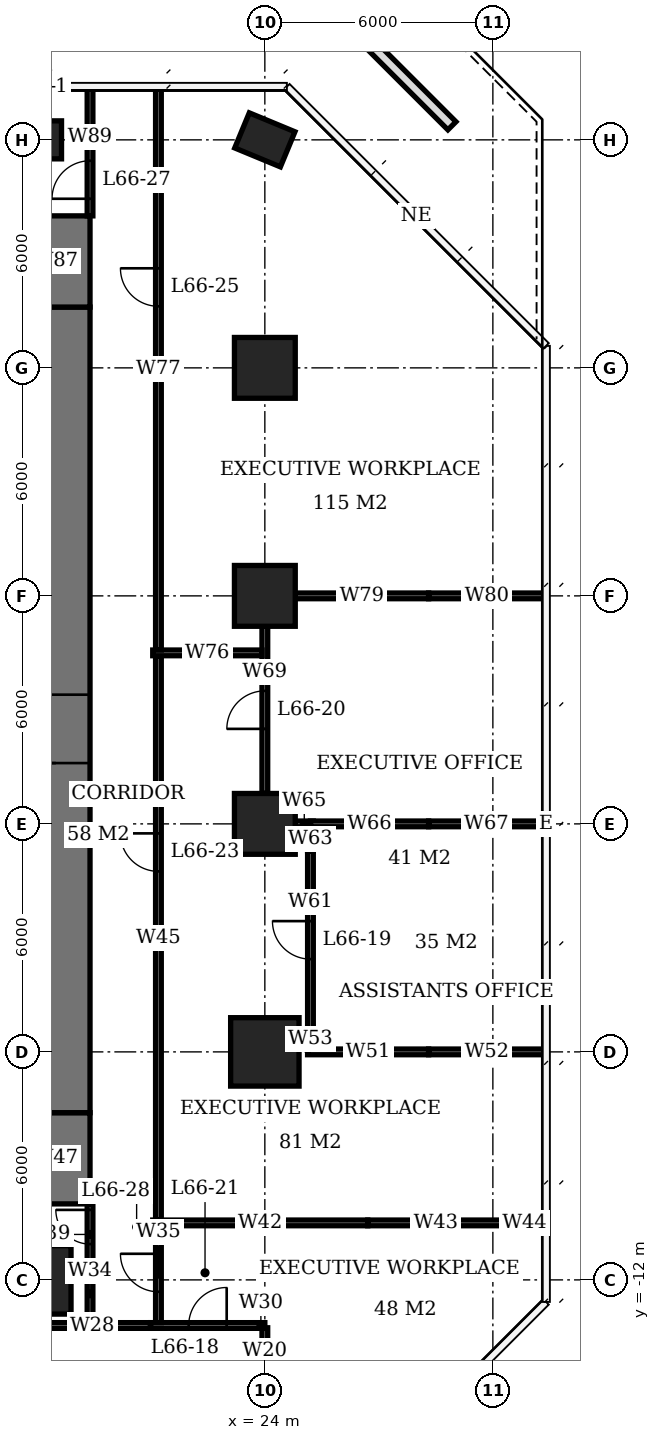
"""IFC4 building model, lengths in metres.
Left out: names, types, materials, properties, quantities, classifications, styles, units other than length and angle.
Written with IfcOpenShell. Run it as: python <this file> out.ifc"""

import sys

from ifc_helpers import new_model, si_unit, direction, frame, frame_2d, origin, origin_2d, place, context, subcontext, project, spatial, rectangle, extrude, element, fill, save


model = new_model("IFC4")
c1 = context("Model", 3, precision=1e-05, world=origin(), true_north=direction((0.0, 1.0)))
c2 = subcontext(c1, "Body", "Model", "MODEL_VIEW")
j1 = project(units=[si_unit("LENGTHUNIT", "METRE"), si_unit("PLANEANGLEUNIT", "RADIAN")], contexts=[c1])
p1 = place(None, origin())
s1 = spatial("IfcSite", under=j1, at=p1, CompositionType="ELEMENT")
p2 = place(p1, origin())
s2 = spatial("IfcBuilding", under=s1, at=p2, CompositionType="ELEMENT")
p3 = place(p2, frame((0.0, 0.0, 268.4)))
s3 = spatial("IfcBuildingStorey", under=s2, at=p3, CompositionType="ELEMENT", Elevation=268.4)
p4 = place(p3, frame((18.0, -12.0, 0.0), z_axis=(0.0, 0.0, 1.0), x_axis=(1.0, 0.0, 0.0)))
e1 = element("IfcColumn", 1, at=p4, inside=s3, PredefinedType="COLUMN", context=c2, shape_type="SweptSolid", body=[
    extrude(rectangle(XDim=1.8, YDim=1.8, at=origin_2d()), origin(), (0.0, 0.0, 1.0), 3.9),
])
p5 = place(p3, frame((18.0, 18.0, 0.0), z_axis=(0.0, 0.0, 1.0), x_axis=(1.0, 0.0, 0.0)))
e2 = element("IfcColumn", 2, at=p5, inside=s3, PredefinedType="COLUMN", context=c2, shape_type="SweptSolid", body=[
    extrude(rectangle(XDim=1.3, YDim=1.0, at=origin_2d()), origin(), (0.0, 0.0, 1.0), 3.9),
])
p6 = place(p3, frame((24.0, -6.0, 0.0), z_axis=(0.0, 0.0, 1.0), x_axis=(1.0, 0.0, 0.0)))
e3 = element("IfcColumn", 3, at=p6, inside=s3, PredefinedType="COLUMN", context=c2, shape_type="SweptSolid", body=[
    extrude(rectangle(XDim=1.8, YDim=1.8, at=origin_2d()), origin(), (0.0, 0.0, 1.0), 3.9),
])
for number, where, z_axis, x_axis in (
    (4, (24.0, 0.0, 0.0), (0.0, 0.0, 1.0), (1.0, 0.0, 0.0)),
    (5, (24.0, 6.0, 0.0), (0.0, 0.0, 1.0), (1.0, 0.0, 0.0)),
    (6, (24.0, 12.0, 0.0), (0.0, 0.0, 1.0), (1.0, 0.0, 0.0)),
):
    element("IfcColumn", number, at=place(p3, frame(where, z_axis=z_axis, x_axis=x_axis)), inside=s3, PredefinedType="COLUMN", context=c2, shape_type="SweptSolid", body=[
        extrude(rectangle(XDim=1.6, YDim=1.6, at=origin_2d()), origin(), (0.0, 0.0, 1.0), 3.9),
    ])
p7 = place(p3, frame((24.0, 18.0, 0.0), z_axis=(0.0, 0.0, 1.0), x_axis=(0.923879532511, -0.382683432365, 0.0)))
e7 = element("IfcColumn", 7, at=p7, inside=s3, PredefinedType="COLUMN", context=c2, shape_type="SweptSolid", body=[
    extrude(rectangle(XDim=1.3, YDim=1.0, at=origin_2d()), origin(), (0.0, 0.0, 1.0), 3.9),
])
p8 = place(p3, frame((18.5, -7.6, 0.0), z_axis=(0.0, 0.0, 1.0), x_axis=(0.0, 1.0, 0.0)))
e8 = element("IfcWall", 8, at=p8, inside=s3, PredefinedType="SHEAR", context=c2, shape_type="SweptSolid", body=[
    extrude(rectangle(XDim=21.2, YDim=1.8, at=frame_2d((10.6, 0.0))), origin(), (0.0, 0.0, 1.0), 3.9),
])
p9 = place(p8, frame((9.2, 0.0, 0.0)))
e9 = element("IfcOpeningElement", 9, at=p9, cuts=e8, PredefinedType="OPENING", context=c2, shape_type="SweptSolid", body=[
    extrude(rectangle(XDim=1.8, YDim=2.4, at=frame_2d((0.9, 1.2))), frame((0.0, 0.91, 0.0), z_axis=(0.0, -1.0, 0.0), x_axis=(1.0, 0.0, 0.0)), (0.0, 0.0, 1.0), 1.82),
])
for number, where, z_axis, x_axis in (
    (10, (18.5, -10.0, 0.0), (0.0, 0.0, 1.0), (0.0, 1.0, 0.0)),
    (11, (18.5, 13.6, 0.0), (0.0, 0.0, 1.0), (0.0, 1.0, 0.0)),
):
    element("IfcWall", number, at=place(p3, frame(where, z_axis=z_axis, x_axis=x_axis)), inside=s3, PredefinedType="SHEAR", context=c2, shape_type="SweptSolid", body=[
        extrude(rectangle(XDim=2.4, YDim=1.8, at=frame_2d((1.2, 0.0))), origin(), (0.0, 0.0, 1.0), 3.9),
    ])
p10 = place(p3, frame((24.37, 22.923, 0.0), z_axis=(0.0, 0.0, 1.0), x_axis=(0.707106781187, -0.707106781187, 0.0)))
e12 = element("IfcWall", 12, at=p10, inside=s3, PredefinedType="USERDEFINED", context=c2, shape_type="SweptSolid", body=[
    extrude(rectangle(XDim=6.438, YDim=0.3, at=frame_2d((3.219, 0.0))), origin(), (0.0, 0.0, 1.0), 0.6),
])
p11 = place(p3, frame((17.925, -13.2, 0.0), z_axis=(0.0, 0.0, 1.0), x_axis=(1.0, 0.0, 0.0)))
e13 = element("IfcWall", 13, at=p11, inside=s3, PredefinedType="PARTITIONING", context=c2, shape_type="SweptSolid", body=[
    extrude(rectangle(XDim=3.067, YDim=0.15, at=frame_2d((1.534, 0.0))), origin(), (0.0, 0.0, 1.0), 2.65),
])
p12 = place(p3, frame((20.992, -13.2, 0.0), z_axis=(0.0, 0.0, 1.0), x_axis=(1.0, 0.0, 0.0)))
e14 = element("IfcWall", 14, at=p12, inside=s3, PredefinedType="PARTITIONING", context=c2, shape_type="SweptSolid", body=[
    extrude(rectangle(XDim=3.008, YDim=0.15, at=frame_2d((1.504, 0.0))), origin(), (0.0, 0.0, 1.0), 3.65),
])
p13 = place(p12, frame((1.004, 0.0, 0.0)))
e15 = element("IfcOpeningElement", 15, at=p13, cuts=e14, PredefinedType="OPENING", context=c2, shape_type="SweptSolid", body=[
    extrude(rectangle(XDim=1.0, YDim=2.4, at=frame_2d((0.5, 1.2))), frame((0.0, 0.085, 0.0), z_axis=(0.0, -1.0, 0.0), x_axis=(1.0, 0.0, 0.0)), (0.0, 0.0, 1.0), 0.17),
])
p14 = place(p3, frame((25.125, -6.0, 0.0), z_axis=(0.0, 0.0, 1.0), x_axis=(1.0, 0.0, 0.0)))
e16 = element("IfcWall", 16, at=p14, inside=s3, PredefinedType="PARTITIONING", context=c2, shape_type="SweptSolid", body=[
    extrude(rectangle(XDim=3.185, YDim=0.15, at=frame_2d((1.593, 0.0))), origin(), (0.0, 0.0, 1.0), 2.65),
])
p15 = place(p3, frame((28.31, -6.0, 0.0), z_axis=(0.0, 0.0, 1.0), x_axis=(1.0, 0.0, 0.0)))
e17 = element("IfcWall", 17, at=p15, inside=s3, PredefinedType="PARTITIONING", context=c2, shape_type="SweptSolid", body=[
    extrude(rectangle(XDim=3.065, YDim=0.15, at=frame_2d((1.532, 0.0))), origin(), (0.0, 0.0, 1.0), 3.65),
])
p16 = place(p3, frame((24.8, 0.0, 0.0), z_axis=(0.0, 0.0, 1.0), x_axis=(1.0, 0.0, 0.0)))
e18 = element("IfcWall", 18, at=p16, inside=s3, PredefinedType="PARTITIONING", context=c2, shape_type="SweptSolid", body=[
    extrude(rectangle(XDim=0.475, YDim=0.15, at=frame_2d((0.237, 0.0))), origin(), (0.0, 0.0, 1.0), 2.65),
])
p17 = place(p3, frame((25.2, 0.0, 0.0), z_axis=(0.0, 0.0, 1.0), x_axis=(1.0, 0.0, 0.0)))
e19 = element("IfcWall", 19, at=p17, inside=s3, PredefinedType="PARTITIONING", context=c2, shape_type="SweptSolid", body=[
    extrude(rectangle(XDim=3.11, YDim=0.15, at=frame_2d((1.555, 0.0))), origin(), (0.0, 0.0, 1.0), 2.65),
])
p18 = place(p3, frame((28.31, 0.0, 0.0), z_axis=(0.0, 0.0, 1.0), x_axis=(1.0, 0.0, 0.0)))
e20 = element("IfcWall", 20, at=p18, inside=s3, PredefinedType="PARTITIONING", context=c2, shape_type="SweptSolid", body=[
    extrude(rectangle(XDim=3.04, YDim=0.15, at=frame_2d((1.52, 0.0))), origin(), (0.0, 0.0, 1.0), 3.65),
])
p19 = place(p3, frame((24.8, 6.0, 0.0), z_axis=(0.0, 0.0, 1.0), x_axis=(1.0, 0.0, 0.0)))
e21 = element("IfcWall", 21, at=p19, inside=s3, PredefinedType="PARTITIONING", context=c2, shape_type="SweptSolid", body=[
    extrude(rectangle(XDim=3.51, YDim=0.15, at=frame_2d((1.755, 0.0))), origin(), (0.0, 0.0, 1.0), 2.65),
])
p20 = place(p3, frame((28.31, 6.0, 0.0), z_axis=(0.0, 0.0, 1.0), x_axis=(1.0, 0.0, 0.0)))
e22 = element("IfcWall", 22, at=p20, inside=s3, PredefinedType="PARTITIONING", context=c2, shape_type="SweptSolid", body=[
    extrude(rectangle(XDim=3.065, YDim=0.15, at=frame_2d((1.532, 0.0))), origin(), (0.0, 0.0, 1.0), 3.65),
])
p21 = place(p3, frame((24.0, -14.49, 0.0), z_axis=(0.0, 0.0, 1.0), x_axis=(0.0, 1.0, 0.0)))
e23 = element("IfcWall", 23, at=p21, inside=s3, PredefinedType="PARTITIONING", context=c2, shape_type="SweptSolid", body=[
    extrude(rectangle(XDim=1.23, YDim=0.15, at=frame_2d((0.615, 0.0))), origin(), (0.0, 0.0, 1.0), 2.65),
])
p22 = place(p3, frame((24.0, 0.8, 0.0), z_axis=(0.0, 0.0, 1.0), x_axis=(0.0, 1.0, 0.0)))
e24 = element("IfcWall", 24, at=p22, inside=s3, PredefinedType="PARTITIONING", context=c2, shape_type="SweptSolid", body=[
    extrude(rectangle(XDim=4.4, YDim=0.15, at=frame_2d((2.2, 0.0))), origin(), (0.0, 0.0, 1.0), 3.65),
])
p23 = place(p22, frame((1.7, 0.0, 0.0)))
e25 = element("IfcOpeningElement", 25, at=p23, cuts=e24, PredefinedType="OPENING", context=c2, shape_type="SweptSolid", body=[
    extrude(rectangle(XDim=1.0, YDim=2.4, at=frame_2d((0.5, 1.2))), frame((0.0, 0.085, 0.0), z_axis=(0.0, -1.0, 0.0), x_axis=(1.0, 0.0, 0.0)), (0.0, 0.0, 1.0), 0.17),
])
p24 = place(p3, frame((25.2, -5.925, 0.0), z_axis=(0.0, 0.0, 1.0), x_axis=(0.0, 1.0, 0.0)))
e26 = element("IfcWall", 26, at=p24, inside=s3, PredefinedType="PARTITIONING", context=c2, shape_type="SweptSolid", body=[
    extrude(rectangle(XDim=0.517, YDim=0.15, at=frame_2d((0.259, 0.0))), origin(), (0.0, 0.0, 1.0), 2.65),
])
p25 = place(p3, frame((25.2, -5.408, 0.0), z_axis=(0.0, 0.0, 1.0), x_axis=(0.0, 1.0, 0.0)))
e27 = element("IfcWall", 27, at=p25, inside=s3, PredefinedType="PARTITIONING", context=c2, shape_type="SweptSolid", body=[
    extrude(rectangle(XDim=4.698, YDim=0.15, at=frame_2d((2.349, 0.0))), origin(), (0.0, 0.0, 1.0), 3.65),
])
p26 = place(p25, frame((1.849, 0.0, 0.0)))
e28 = element("IfcOpeningElement", 28, at=p26, cuts=e27, PredefinedType="OPENING", context=c2, shape_type="SweptSolid", body=[
    extrude(rectangle(XDim=1.0, YDim=2.4, at=frame_2d((0.5, 1.2))), frame((0.0, 0.085, 0.0), z_axis=(0.0, -1.0, 0.0), x_axis=(1.0, 0.0, 0.0)), (0.0, 0.0, 1.0), 0.17),
])
p27 = place(p3, frame((25.2, -0.71, 0.0), z_axis=(0.0, 0.0, 1.0), x_axis=(0.0, 1.0, 0.0)))
e29 = element("IfcWall", 29, at=p27, inside=s3, PredefinedType="PARTITIONING", context=c2, shape_type="SweptSolid", body=[
    extrude(rectangle(XDim=0.635, YDim=0.15, at=frame_2d((0.317, 0.0))), origin(), (0.0, 0.0, 1.0), 2.65),
])
p28 = place(p3, frame((19.4, -13.125, 0.0), z_axis=(0.0, 0.0, 1.0), x_axis=(0.0, 1.0, 0.0)))
e30 = element("IfcWall", 30, at=p28, inside=s3, PredefinedType="PARTITIONING", context=c2, shape_type="SweptSolid", body=[
    extrude(rectangle(XDim=1.517, YDim=0.15, at=frame_2d((0.759, 0.0))), origin(), (0.0, 0.0, 1.0), 2.65),
])
p29 = place(p3, frame((19.4, -11.608, 0.0), z_axis=(0.0, 0.0, 1.0), x_axis=(0.0, 1.0, 0.0)))
e31 = element("IfcWall", 31, at=p29, inside=s3, PredefinedType="PARTITIONING", context=c2, shape_type="SweptSolid", body=[
    extrude(rectangle(XDim=1.608, YDim=0.15, at=frame_2d((0.804, 0.0))), origin(), (0.0, 0.0, 1.0), 3.65),
])
p30 = place(p29, frame((0.55, 0.0, 0.0)))
e32 = element("IfcOpeningElement", 32, at=p30, cuts=e31, PredefinedType="OPENING", context=c2, shape_type="SweptSolid", body=[
    extrude(rectangle(XDim=0.9, YDim=2.1, at=frame_2d((0.45, 1.05))), frame((0.0, 0.085, 0.0), z_axis=(0.0, -1.0, 0.0), x_axis=(1.0, 0.0, 0.0)), (0.0, 0.0, 1.0), 0.17),
])
p31 = place(p3, frame((19.4, 16.0, 0.0), z_axis=(0.0, 0.0, 1.0), x_axis=(0.0, 1.0, 0.0)))
e33 = element("IfcWall", 33, at=p31, inside=s3, PredefinedType="PARTITIONING", context=c2, shape_type="SweptSolid", body=[
    extrude(rectangle(XDim=3.375, YDim=0.15, at=frame_2d((1.688, 0.0))), origin(), (0.0, 0.0, 1.0), 3.65),
])
p32 = place(p31, frame((0.45, 0.0, 0.0)))
e34 = element("IfcOpeningElement", 34, at=p32, cuts=e33, PredefinedType="OPENING", context=c2, shape_type="SweptSolid", body=[
    extrude(rectangle(XDim=1.0, YDim=2.1, at=frame_2d((0.5, 1.05))), frame((0.0, 0.085, 0.0), z_axis=(0.0, -1.0, 0.0), x_axis=(1.0, 0.0, 0.0)), (0.0, 0.0, 1.0), 0.17),
])
p33 = place(p3, frame((21.2, -13.125, 0.0), z_axis=(0.0, 0.0, 1.0), x_axis=(0.0, 1.0, 0.0)))
e35 = element("IfcWall", 35, at=p33, inside=s3, PredefinedType="PARTITIONING", context=c2, shape_type="SweptSolid", body=[
    extrude(rectangle(XDim=2.55, YDim=0.15, at=frame_2d((1.275, 0.0))), origin(), (0.0, 0.0, 1.0), 3.65),
])
p34 = place(p33, frame((0.812, 0.0, 0.0)))
e36 = element("IfcOpeningElement", 36, at=p34, cuts=e35, PredefinedType="OPENING", context=c2, shape_type="SweptSolid", body=[
    extrude(rectangle(XDim=1.0, YDim=2.4, at=frame_2d((0.5, 1.2))), frame((0.0, 0.085, 0.0), z_axis=(0.0, -1.0, 0.0), x_axis=(1.0, 0.0, 0.0)), (0.0, 0.0, 1.0), 0.17),
])
p35 = place(p3, frame((21.2, -10.425, 0.0), z_axis=(0.0, 0.0, 1.0), x_axis=(0.0, 1.0, 0.0)))
e37 = element("IfcWall", 37, at=p35, inside=s3, PredefinedType="PARTITIONING", context=c2, shape_type="SweptSolid", body=[
    extrude(rectangle(XDim=14.85, YDim=0.15, at=frame_2d((7.425, 0.0))), origin(), (0.0, 0.0, 1.0), 3.65),
])
p36 = place(p35, frame((9.175, 0.0, 0.0)))
e38 = element("IfcOpeningElement", 38, at=p36, cuts=e37, PredefinedType="OPENING", context=c2, shape_type="SweptSolid", body=[
    extrude(rectangle(XDim=1.0, YDim=2.4, at=frame_2d((0.5, 1.2))), frame((0.0, 0.085, 0.0), z_axis=(0.0, -1.0, 0.0), x_axis=(1.0, 0.0, 0.0)), (0.0, 0.0, 1.0), 0.17),
])
p37 = place(p3, frame((21.05, -10.5, 0.0), z_axis=(0.0, 0.0, 1.0), x_axis=(1.0, 0.0, 0.0)))
e39 = element("IfcWall", 39, at=p37, inside=s3, PredefinedType="PARTITIONING", context=c2, shape_type="SweptSolid", body=[
    extrude(rectangle(XDim=5.658, YDim=0.15, at=frame_2d((2.829, 0.0))), origin(), (0.0, 0.0, 1.0), 3.65),
])
p38 = place(p3, frame((26.708, -10.5, 0.0), z_axis=(0.0, 0.0, 1.0), x_axis=(1.0, 0.0, 0.0)))
e40 = element("IfcWall", 40, at=p38, inside=s3, PredefinedType="PARTITIONING", context=c2, shape_type="SweptSolid", body=[
    extrude(rectangle(XDim=3.584, YDim=0.15, at=frame_2d((1.792, 0.0))), origin(), (0.0, 0.0, 1.0), 2.65),
])
p39 = place(p3, frame((30.292, -10.5, 0.0), z_axis=(0.0, 0.0, 1.0), x_axis=(1.0, 0.0, 0.0)))
e41 = element("IfcWall", 41, at=p39, inside=s3, PredefinedType="PARTITIONING", context=c2, shape_type="SweptSolid", body=[
    extrude(rectangle(XDim=1.083, YDim=0.15, at=frame_2d((0.542, 0.0))), origin(), (0.0, 0.0, 1.0), 3.65),
])
p40 = place(p3, frame((21.2, 4.575, 0.0), z_axis=(0.0, 0.0, 1.0), x_axis=(0.0, 1.0, 0.0)))
e42 = element("IfcWall", 42, at=p40, inside=s3, PredefinedType="PARTITIONING", context=c2, shape_type="SweptSolid", body=[
    extrude(rectangle(XDim=14.8, YDim=0.15, at=frame_2d((7.4, 0.0))), origin(), (0.0, 0.0, 1.0), 3.65),
])
p41 = place(p40, frame((9.045, 0.0, 0.0)))
e43 = element("IfcOpeningElement", 43, at=p41, cuts=e42, PredefinedType="OPENING", context=c2, shape_type="SweptSolid", body=[
    extrude(rectangle(XDim=1.0, YDim=2.4, at=frame_2d((0.5, 1.2))), frame((0.0, 0.085, 0.0), z_axis=(0.0, -1.0, 0.0), x_axis=(1.0, 0.0, 0.0)), (0.0, 0.0, 1.0), 0.17),
])
p42 = place(p3, frame((21.05, 4.5, 0.0), z_axis=(0.0, 0.0, 1.0), x_axis=(1.0, 0.0, 0.0)))
e44 = element("IfcWall", 44, at=p42, inside=s3, PredefinedType="PARTITIONING", context=c2, shape_type="SweptSolid", body=[
    extrude(rectangle(XDim=2.875, YDim=0.15, at=frame_2d((1.438, 0.0))), origin(), (0.0, 0.0, 1.0), 3.65),
])
p43 = place(p9, origin())
e45 = element("IfcDoor", 45, at=p43, inside=s3, OperationType="DOUBLE_DOOR_SINGLE_SWING", PredefinedType="DOOR", context=c2, shape_type="SweptSolid", body=[
    extrude(rectangle(XDim=1.8, YDim=2.4, at=frame_2d((0.9, 1.2))), frame((0.0, 0.025, 0.0), z_axis=(0.0, -1.0, 0.0), x_axis=(1.0, 0.0, 0.0)), (0.0, 0.0, 1.0), 0.05),
])
fill(e9, e45)
p44 = place(p13, origin())
e46 = element("IfcDoor", 46, at=p44, inside=s3, OperationType="SINGLE_SWING_RIGHT", PredefinedType="DOOR", context=c2, shape_type="SweptSolid", body=[
    extrude(rectangle(XDim=1.0, YDim=2.4, at=frame_2d((0.5, 1.2))), frame((0.0, 0.025, 0.0), z_axis=(0.0, -1.0, 0.0), x_axis=(1.0, 0.0, 0.0)), (0.0, 0.0, 1.0), 0.05),
])
fill(e15, e46)
p45 = place(p26, origin())
e47 = element("IfcDoor", 47, at=p45, inside=s3, OperationType="SINGLE_SWING_RIGHT", PredefinedType="DOOR", context=c2, shape_type="SweptSolid", body=[
    extrude(rectangle(XDim=1.0, YDim=2.4, at=frame_2d((0.5, 1.2))), frame((0.0, 0.025, 0.0), z_axis=(0.0, -1.0, 0.0), x_axis=(1.0, 0.0, 0.0)), (0.0, 0.0, 1.0), 0.05),
])
fill(e28, e47)
p46 = place(p23, origin())
e48 = element("IfcDoor", 48, at=p46, inside=s3, OperationType="SINGLE_SWING_LEFT", PredefinedType="DOOR", context=c2, shape_type="SweptSolid", body=[
    extrude(rectangle(XDim=1.0, YDim=2.4, at=frame_2d((0.5, 1.2))), frame((0.0, 0.025, 0.0), z_axis=(0.0, -1.0, 0.0), x_axis=(1.0, 0.0, 0.0)), (0.0, 0.0, 1.0), 0.05),
])
fill(e25, e48)
p47 = place(p34, origin())
e49 = element("IfcDoor", 49, at=p47, inside=s3, OperationType="SINGLE_SWING_RIGHT", PredefinedType="DOOR", context=c2, shape_type="SweptSolid", body=[
    extrude(rectangle(XDim=1.0, YDim=2.4, at=frame_2d((0.5, 1.2))), frame((0.0, 0.025, 0.0), z_axis=(0.0, -1.0, 0.0), x_axis=(1.0, 0.0, 0.0)), (0.0, 0.0, 1.0), 0.05),
])
fill(e36, e49)
p48 = place(p36, origin())
e50 = element("IfcDoor", 50, at=p48, inside=s3, OperationType="SINGLE_SWING_RIGHT", PredefinedType="DOOR", context=c2, shape_type="SweptSolid", body=[
    extrude(rectangle(XDim=1.0, YDim=2.4, at=frame_2d((0.5, 1.2))), frame((0.0, 0.025, 0.0), z_axis=(0.0, -1.0, 0.0), x_axis=(1.0, 0.0, 0.0)), (0.0, 0.0, 1.0), 0.05),
])
fill(e38, e50)
p49 = place(p41, origin())
e51 = element("IfcDoor", 51, at=p49, inside=s3, OperationType="SINGLE_SWING_RIGHT", PredefinedType="DOOR", context=c2, shape_type="SweptSolid", body=[
    extrude(rectangle(XDim=1.0, YDim=2.4, at=frame_2d((0.5, 1.2))), frame((0.0, 0.025, 0.0), z_axis=(0.0, -1.0, 0.0), x_axis=(1.0, 0.0, 0.0)), (0.0, 0.0, 1.0), 0.05),
])
fill(e43, e51)
p50 = place(p32, origin())
e52 = element("IfcDoor", 52, at=p50, inside=s3, OperationType="SINGLE_SWING_LEFT", PredefinedType="DOOR", context=c2, shape_type="SweptSolid", body=[
    extrude(rectangle(XDim=1.0, YDim=2.1, at=frame_2d((0.5, 1.05))), frame((0.0, 0.025, 0.0), z_axis=(0.0, -1.0, 0.0), x_axis=(1.0, 0.0, 0.0)), (0.0, 0.0, 1.0), 0.05),
])
fill(e34, e52)
p51 = place(p30, origin())
e53 = element("IfcDoor", 53, at=p51, inside=s3, OperationType="SINGLE_SWING_RIGHT", PredefinedType="DOOR", context=c2, shape_type="SweptSolid", body=[
    extrude(rectangle(XDim=0.9, YDim=2.1, at=frame_2d((0.45, 1.05))), frame((0.0, 0.025, 0.0), z_axis=(0.0, -1.0, 0.0), x_axis=(1.0, 0.0, 0.0)), (0.0, 0.0, 1.0), 0.05),
])
fill(e32, e53)
save(model, sys.argv[1])
